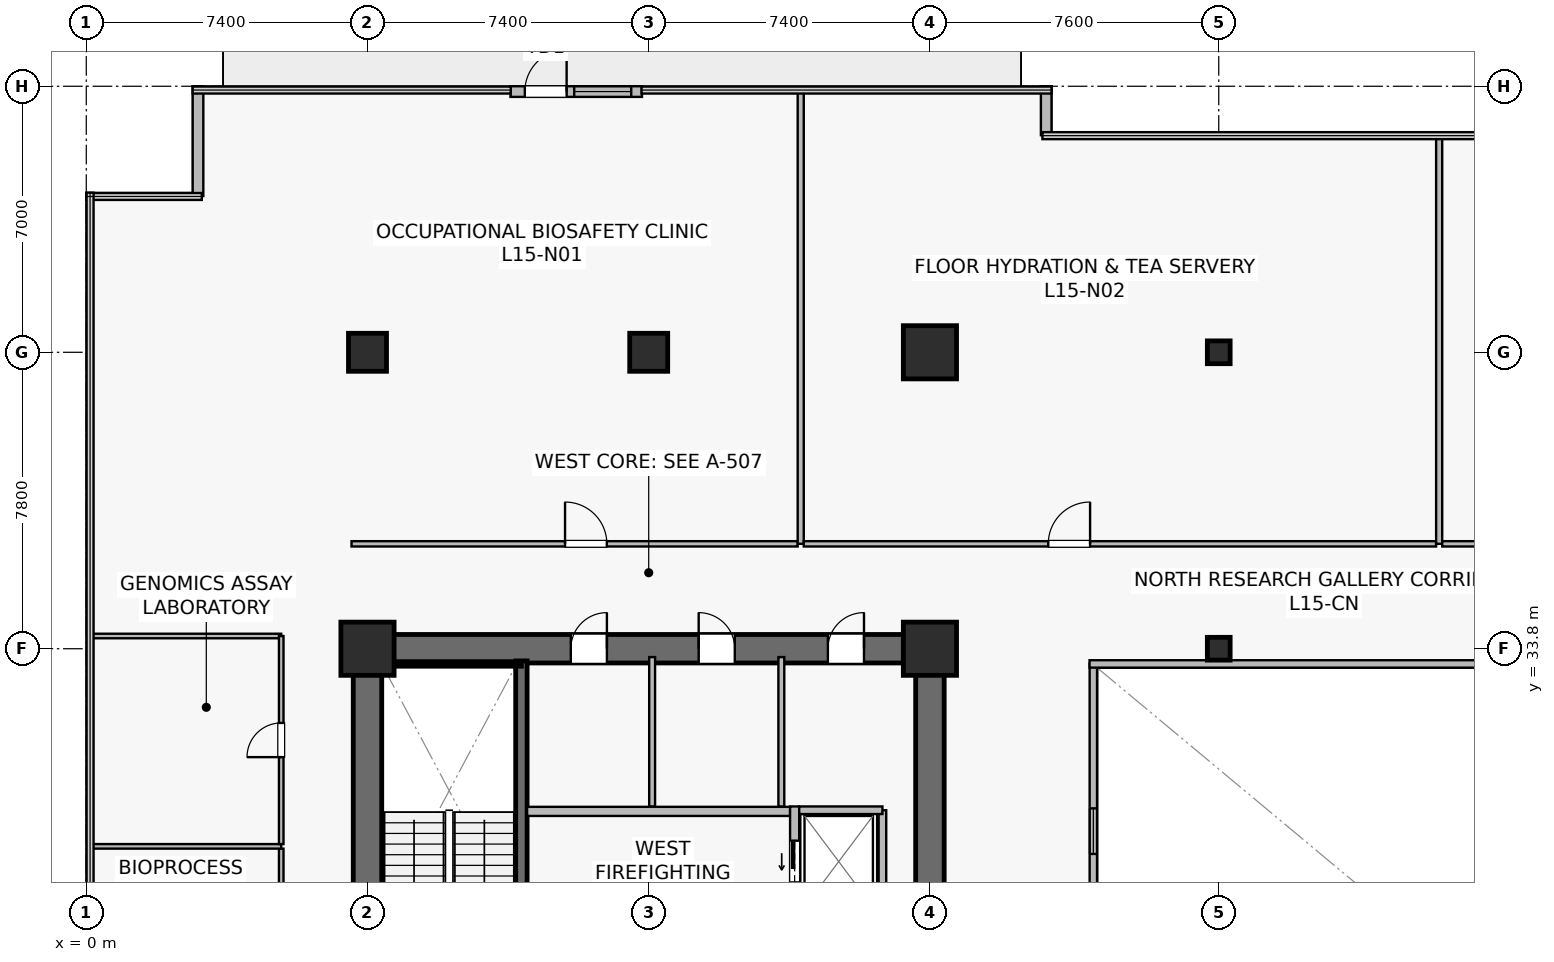
"""IFC4 building model, lengths in metres.
Left out: names, types, materials, properties, quantities, classifications, styles, units other than length and angle.
Written with IfcOpenShell. Run it as: python <this file> out.ifc"""

import sys

from ifc_helpers import new_model, si_unit, direction, frame, frame_2d, origin, origin_2d, place, context, subcontext, project, spatial, rectangle, hollow_rectangle, extrude, source, transform, mapped, element, fill, save


model = new_model("IFC4")
c1 = context("Model", 3, precision=1e-05, world=origin(), true_north=direction((0.0, 1.0)))
c2 = subcontext(c1, "Body", "Model", "MODEL_VIEW")
j1 = project(units=[si_unit("LENGTHUNIT", "METRE"), si_unit("PLANEANGLEUNIT", "RADIAN")], contexts=[c1])
p1 = place(None, origin())
s1 = spatial("IfcSite", under=j1, at=p1, CompositionType="ELEMENT")
p2 = place(p1, origin())
s2 = spatial("IfcBuilding", under=s1, at=p2, CompositionType="ELEMENT")
p3 = place(p2, frame((0.0, 0.0, 62.1)))
s3 = spatial("IfcBuildingStorey", under=s2, at=p3, CompositionType="ELEMENT", Elevation=62.1)
p4 = place(p3, frame((7.025, 33.8, 0.0), z_axis=(0.0, 0.0, 1.0), x_axis=(1.0, 0.0, 0.0)))
e1 = element("IfcWall", 1, at=p4, inside=s3, PredefinedType="SHEAR", context=c2, shape_type="SweptSolid", body=[
    extrude(rectangle(XDim=15.55, YDim=0.75, at=frame_2d((7.775, 0.0))), origin(), (0.0, 0.0, 1.0), 3.78),
])
p5 = place(p4, frame((5.725, 0.0, 0.0)))
e2 = element("IfcOpeningElement", 2, at=p5, cuts=e1, PredefinedType="OPENING", context=c2, shape_type="SweptSolid", body=[
    extrude(rectangle(XDim=0.95, YDim=2.15, at=frame_2d((0.475, 1.075))), frame((0.0, 0.385, 0.0), z_axis=(0.0, -1.0, 0.0), x_axis=(1.0, 0.0, 0.0)), (0.0, 0.0, 1.0), 0.77),
])
p6 = place(p4, frame((9.09, 0.0, 0.0)))
e3 = element("IfcOpeningElement", 3, at=p6, cuts=e1, PredefinedType="OPENING", context=c2, shape_type="SweptSolid", body=[
    extrude(rectangle(XDim=0.95, YDim=2.15, at=frame_2d((0.475, 1.075))), frame((0.0, 0.385, 0.0), z_axis=(0.0, -1.0, 0.0), x_axis=(1.0, 0.0, 0.0)), (0.0, 0.0, 1.0), 0.77),
])
p7 = place(p4, frame((12.49, 0.0, 0.0)))
e4 = element("IfcOpeningElement", 4, at=p7, cuts=e1, PredefinedType="OPENING", context=c2, shape_type="SweptSolid", body=[
    extrude(rectangle(XDim=0.95, YDim=2.15, at=frame_2d((0.475, 1.075))), frame((0.0, 0.385, 0.0), z_axis=(0.0, -1.0, 0.0), x_axis=(1.0, 0.0, 0.0)), (0.0, 0.0, 1.0), 0.77),
])
p8 = place(p3, frame((7.4, 15.175, 0.0), z_axis=(0.0, 0.0, 1.0), x_axis=(0.0, 1.0, 0.0)))
e5 = element("IfcWall", 5, at=p8, inside=s3, PredefinedType="SHEAR", context=c2, shape_type="SweptSolid", body=[
    extrude(rectangle(XDim=18.25, YDim=0.75, at=frame_2d((9.125, 0.0))), origin(), (0.0, 0.0, 1.0), 3.78),
])
p9 = place(p3, frame((22.2, 15.175, 0.0), z_axis=(0.0, 0.0, 1.0), x_axis=(0.0, 1.0, 0.0)))
e6 = element("IfcWall", 6, at=p9, inside=s3, PredefinedType="SHEAR", context=c2, shape_type="SweptSolid", body=[
    extrude(rectangle(XDim=18.25, YDim=0.75, at=frame_2d((9.125, 0.0))), origin(), (0.0, 0.0, 1.0), 3.78),
])
p10 = place(p9, frame((3.375, 0.0, 0.0)))
e7 = element("IfcOpeningElement", 7, at=p10, cuts=e6, PredefinedType="OPENING", context=c2, shape_type="SweptSolid", body=[
    extrude(rectangle(XDim=1.42, YDim=2.2, at=frame_2d((0.71, 1.1))), frame((0.0, 0.385, 0.0), z_axis=(0.0, -1.0, 0.0), x_axis=(1.0, 0.0, 0.0)), (0.0, 0.0, 1.0), 0.77),
])
p11 = place(p3, frame((11.45, 24.85, 0.0), z_axis=(0.0, 0.0, 1.0), x_axis=(0.0, 1.0, 0.0)))
e8 = element("IfcWall", 8, at=p11, inside=s3, PredefinedType="SHEAR", context=c2, shape_type="SweptSolid", body=[
    extrude(rectangle(XDim=8.63, YDim=0.3, at=frame_2d((4.315, 0.0))), origin(), (0.0, 0.0, 1.0), 3.78),
])
p12 = place(p11, frame((0.42, 0.0, 0.0)))
e9 = element("IfcOpeningElement", 9, at=p12, cuts=e8, PredefinedType="OPENING", context=c2, shape_type="SweptSolid", body=[
    extrude(rectangle(XDim=1.1, YDim=2.15, at=frame_2d((0.55, 1.075))), frame((0.0, 0.16, 0.0), z_axis=(0.0, -1.0, 0.0), x_axis=(1.0, 0.0, 0.0)), (0.0, 0.0, 1.0), 0.32),
])
p13 = place(p3, frame((7.73, 33.4, 0.0), z_axis=(0.0, 0.0, 1.0), x_axis=(1.0, 0.0, 0.0)))
e10 = element("IfcWall", 10, at=p13, inside=s3, PredefinedType="SOLIDWALL", context=c2, shape_type="SweptSolid", body=[
    extrude(rectangle(XDim=3.72, YDim=0.12, at=frame_2d((1.86, 0.0))), origin(), (0.0, 0.0, 1.0), 3.78),
])
m1 = source(origin(), c2, "Body", "SweptSolid", [
    extrude(rectangle(XDim=1.4, YDim=1.4, at=origin_2d()), origin(), (0.0, 0.0, 1.0), 4.1),
])
for number, where, z_axis, x_axis in (
    (11, (7.4, 33.8, 0.0), (0.0, 0.0, 1.0), (1.0, 0.0, 0.0)),
    (12, (22.2, 33.8, 0.0), (0.0, 0.0, 1.0), (1.0, 0.0, 0.0)),
):
    element("IfcColumn", number, at=place(p3, frame(where, z_axis=z_axis, x_axis=x_axis)), inside=s3, PredefinedType="COLUMN", context=c2, shape_type="MappedRepresentation", body=[
        mapped(m1, transform((0.0, 0.0, 0.0), scale=1.0)),
    ])
m2 = source(origin(), c2, "Body", "SweptSolid", [
    extrude(rectangle(XDim=1.0, YDim=1.0, at=origin_2d()), origin(), (0.0, 0.0, 1.0), 4.1),
])
p14 = place(p3, frame((14.8, 41.6, 0.0), z_axis=(0.0, 0.0, 1.0), x_axis=(1.0, 0.0, 0.0)))
e13 = element("IfcColumn", 13, at=p14, inside=s3, PredefinedType="COLUMN", context=c2, shape_type="MappedRepresentation", body=[
    mapped(m2, transform((0.0, 0.0, 0.0), scale=1.0)),
])
p15 = place(p3, frame((22.2, 41.6, 0.0), z_axis=(0.0, 0.0, 1.0), x_axis=(1.0, 0.0, 0.0)))
e14 = element("IfcColumn", 14, at=p15, inside=s3, PredefinedType="COLUMN", context=c2, shape_type="MappedRepresentation", body=[
    mapped(m1, transform((0.0, 0.0, 0.0), scale=1.0)),
])
p16 = place(p3, frame((7.4, 41.6, 0.0), z_axis=(0.0, 0.0, 1.0), x_axis=(1.0, 0.0, 0.0)))
e15 = element("IfcColumn", 15, at=p16, inside=s3, PredefinedType="COLUMN", context=c2, shape_type="MappedRepresentation", body=[
    mapped(m2, transform((0.0, 0.0, 0.0), scale=1.0)),
])
m3 = source(origin(), c2, "Body", "SweptSolid", [
    extrude(hollow_rectangle(XDim=0.6, YDim=0.6, WallThickness=0.028, at=origin_2d()), origin(), (0.0, 0.0, 1.0), 4.1),
])
for number, where, z_axis, x_axis in (
    (16, (29.8, 33.8, 0.0), (0.0, 0.0, 1.0), (1.0, 0.0, 0.0)),
    (17, (29.8, 41.6, 0.0), (0.0, 0.0, 1.0), (1.0, 0.0, 0.0)),
):
    element("IfcColumn", number, at=place(p3, frame(where, z_axis=z_axis, x_axis=x_axis)), inside=s3, PredefinedType="COLUMN", context=c2, shape_type="MappedRepresentation", body=[
        mapped(m3, transform((0.0, 0.0, 0.0), scale=1.0)),
    ])
p17 = place(p3, frame((11.162, 48.46, 0.0), z_axis=(0.0, 0.0, 1.0), x_axis=(1.0, 0.0, 0.0)))
e18 = element("IfcWall", 18, at=p17, inside=s3, PredefinedType="STANDARD", context=c2, shape_type="SweptSolid", body=[
    extrude(rectangle(XDim=3.461, YDim=0.28, at=frame_2d((1.73, 0.0))), origin(), (0.0, 0.0, 1.0), 3.78),
])
p18 = place(p17, frame((0.378, 0.0, 0.0)))
e19 = element("IfcOpeningElement", 19, at=p18, cuts=e18, PredefinedType="OPENING", context=c2, shape_type="SweptSolid", body=[
    extrude(rectangle(XDim=1.1, YDim=2.2, at=frame_2d((0.55, 1.1))), frame((0.0, 0.15, 0.0), z_axis=(0.0, -1.0, 0.0), x_axis=(1.0, 0.0, 0.0)), (0.0, 0.0, 1.0), 0.3),
])
p19 = place(p17, frame((1.678, 0.0, 0.9)))
e20 = element("IfcOpeningElement", 20, at=p19, cuts=e18, PredefinedType="OPENING", context=c2, shape_type="SweptSolid", body=[
    extrude(rectangle(XDim=1.5, YDim=2.2, at=frame_2d((0.75, 1.1))), frame((0.0, 0.15, 0.0), z_axis=(0.0, -1.0, 0.0), x_axis=(1.0, 0.0, 0.0)), (0.0, 0.0, 1.0), 0.3),
])
p20 = place(p3, frame((25.26, 47.312, 0.0), z_axis=(0.0, 0.0, 1.0), x_axis=(0.0, 1.0, 0.0)))
e21 = element("IfcWall", 21, at=p20, inside=s3, PredefinedType="STANDARD", context=c2, shape_type="SweptSolid", body=[
    extrude(rectangle(XDim=1.288, YDim=0.28, at=frame_2d((0.644, 0.0))), origin(), (0.0, 0.0, 1.0), 3.78),
])
p21 = place(p3, frame((2.94, 48.6, 0.0), z_axis=(0.0, 0.0, 1.0), x_axis=(0.0, -1.0, 0.0)))
e22 = element("IfcWall", 22, at=p21, inside=s3, PredefinedType="STANDARD", context=c2, shape_type="SweptSolid", body=[
    extrude(rectangle(XDim=2.888, YDim=0.28, at=frame_2d((1.444, 0.0))), origin(), (0.0, 0.0, 1.0), 3.78),
])
p22 = place(p3, frame((11.6, 29.52, 0.0), z_axis=(0.0, 0.0, 1.0), x_axis=(1.0, 0.0, 0.0)))
e23 = element("IfcWall", 23, at=p22, inside=s3, PredefinedType="SOLIDWALL", context=c2, shape_type="SweptSolid", body=[
    extrude(rectangle(XDim=6.92, YDim=0.24, at=frame_2d((3.46, 0.0))), origin(), (0.0, 0.0, 1.0), 3.115),
])
p23 = place(p3, frame((18.64, 22.8, 0.0), z_axis=(0.0, 0.0, 1.0), x_axis=(0.0, 1.0, 0.0)))
e24 = element("IfcWall", 24, at=p23, inside=s3, PredefinedType="SOLIDWALL", context=c2, shape_type="SweptSolid", body=[
    extrude(rectangle(XDim=6.85, YDim=0.24, at=frame_2d((3.425, 0.0))), origin(), (0.0, 0.0, 1.0), 2.865),
])
p24 = place(p23, frame((4.85, 0.0, 0.0)))
e25 = element("IfcOpeningElement", 25, at=p24, cuts=e24, PredefinedType="OPENING", context=c2, shape_type="SweptSolid", body=[
    extrude(rectangle(XDim=1.1, YDim=2.22, at=frame_2d((0.55, 1.11))), frame((0.0, 0.13, 0.0), z_axis=(0.0, -1.0, 0.0), x_axis=(1.0, 0.0, 0.0)), (0.0, 0.0, 1.0), 0.26),
])
p25 = place(p23, frame((1.0, 0.0, 0.0)))
e26 = element("IfcOpeningElement", 26, at=p25, cuts=e24, PredefinedType="OPENING", context=c2, shape_type="SweptSolid", body=[
    extrude(rectangle(XDim=1.2, YDim=2.22, at=frame_2d((0.6, 1.11))), frame((0.0, 0.13, 0.0), z_axis=(0.0, -1.0, 0.0), x_axis=(1.0, 0.0, 0.0)), (0.0, 0.0, 1.0), 0.26),
])
p26 = place(p3, frame((20.95, 26.85, 0.0), z_axis=(0.0, 0.0, 1.0), x_axis=(0.0, 1.0, 0.0)))
e27 = element("IfcWall", 27, at=p26, inside=s3, PredefinedType="SOLIDWALL", context=c2, shape_type="SweptSolid", body=[
    extrude(rectangle(XDim=2.7, YDim=0.2, at=frame_2d((1.35, 0.0))), origin(), (0.0, 0.0, 1.0), 3.78),
])
p27 = place(p3, frame((18.76, 29.55, 0.0), z_axis=(0.0, 0.0, 1.0), x_axis=(1.0, 0.0, 0.0)))
e28 = element("IfcWall", 28, at=p27, inside=s3, PredefinedType="SOLIDWALL", context=c2, shape_type="SweptSolid", body=[
    extrude(rectangle(XDim=2.19, YDim=0.2, at=frame_2d((1.095, 0.0))), origin(), (0.0, 0.0, 1.0), 3.78),
])
p28 = place(p3, frame((14.89, 29.65, 0.0), z_axis=(0.0, 0.0, 1.0), x_axis=(0.0, 1.0, 0.0)))
e29 = element("IfcWall", 29, at=p28, inside=s3, PredefinedType="PLUMBINGWALL", context=c2, shape_type="SweptSolid", body=[
    extrude(rectangle(XDim=3.93, YDim=0.155, at=frame_2d((1.965, 0.0))), origin(), (0.0, 0.0, 1.0), 3.115),
])
p29 = place(p3, frame((18.29, 29.65, 0.0), z_axis=(0.0, 0.0, 1.0), x_axis=(0.0, 1.0, 0.0)))
e30 = element("IfcWall", 30, at=p29, inside=s3, PredefinedType="PLUMBINGWALL", context=c2, shape_type="SweptSolid", body=[
    extrude(rectangle(XDim=3.93, YDim=0.155, at=frame_2d((1.965, 0.0))), origin(), (0.0, 0.0, 1.0), 3.78),
])
p30 = place(p3, frame((26.5, 15.2, 0.0), z_axis=(0.0, 0.0, 1.0), x_axis=(0.0, 1.0, 0.0)))
e31 = element("IfcWall", 31, at=p30, inside=s3, PredefinedType="SOLIDWALL", context=c2, shape_type="SweptSolid", body=[
    extrude(rectangle(XDim=18.2, YDim=0.195, at=frame_2d((9.1, 0.0))), origin(), (0.0, 0.0, 1.0), 3.78),
])
p31 = place(p30, frame((1.8, 0.0, 0.9)))
e32 = element("IfcOpeningElement", 32, at=p31, cuts=e31, PredefinedType="OPENING", context=c2, shape_type="SweptSolid", body=[
    extrude(rectangle(XDim=1.2, YDim=1.35, at=frame_2d((0.6, 0.675))), frame((0.0, 0.107, 0.0), z_axis=(0.0, -1.0, 0.0), x_axis=(1.0, 0.0, 0.0)), (0.0, 0.0, 1.0), 0.215),
])
p32 = place(p30, frame((13.2, 0.0, 0.9)))
e33 = element("IfcOpeningElement", 33, at=p32, cuts=e31, PredefinedType="OPENING", context=c2, shape_type="SweptSolid", body=[
    extrude(rectangle(XDim=1.2, YDim=1.35, at=frame_2d((0.6, 0.675))), frame((0.0, 0.107, 0.0), z_axis=(0.0, -1.0, 0.0), x_axis=(1.0, 0.0, 0.0)), (0.0, 0.0, 1.0), 0.215),
])
p33 = place(p3, frame((26.4, 33.4, 0.0), z_axis=(0.0, 0.0, 1.0), x_axis=(1.0, 0.0, 0.0)))
e34 = element("IfcWall", 34, at=p33, inside=s3, PredefinedType="SOLIDWALL", context=c2, shape_type="SweptSolid", body=[
    extrude(rectangle(XDim=22.0, YDim=0.195, at=frame_2d((11.0, 0.0))), origin(), (0.0, 0.0, 1.0), 3.78),
])
p34 = place(p3, frame((6.98, 36.56, 0.0), z_axis=(0.0, 0.0, 1.0), x_axis=(1.0, 0.0, 0.0)))
e35 = element("IfcWall", 35, at=p34, inside=s3, PredefinedType="PARTITIONING", context=c2, shape_type="SweptSolid", body=[
    extrude(rectangle(XDim=11.74, YDim=0.14, at=frame_2d((5.87, 0.0))), origin(), (0.0, 0.0, 1.0), 3.115),
])
p35 = place(p34, frame((5.618, 0.0, 0.0)))
e36 = element("IfcOpeningElement", 36, at=p35, cuts=e35, PredefinedType="OPENING", context=c2, shape_type="SweptSolid", body=[
    extrude(rectangle(XDim=1.1, YDim=2.18, at=frame_2d((0.55, 1.09))), frame((0.0, 0.08, 0.0), z_axis=(0.0, -1.0, 0.0), x_axis=(1.0, 0.0, 0.0)), (0.0, 0.0, 1.0), 0.16),
])
p36 = place(p3, frame((18.8, 36.56, 0.0), z_axis=(0.0, 0.0, 1.0), x_axis=(0.0, 1.0, 0.0)))
e37 = element("IfcWall", 37, at=p36, inside=s3, PredefinedType="PARTITIONING", context=c2, shape_type="SweptSolid", body=[
    extrude(rectangle(XDim=11.93, YDim=0.16, at=frame_2d((5.965, 0.0))), origin(), (0.0, 0.0, 1.0), 3.015),
])
p37 = place(p3, frame((18.88, 36.56, 0.0), z_axis=(0.0, 0.0, 1.0), x_axis=(1.0, 0.0, 0.0)))
e38 = element("IfcWall", 38, at=p37, inside=s3, PredefinedType="PARTITIONING", context=c2, shape_type="SweptSolid", body=[
    extrude(rectangle(XDim=16.64, YDim=0.14, at=frame_2d((8.32, 0.0))), origin(), (0.0, 0.0, 1.0), 3.115),
])
p38 = place(p37, frame((6.434, 0.0, 0.0)))
e39 = element("IfcOpeningElement", 39, at=p38, cuts=e38, PredefinedType="OPENING", context=c2, shape_type="SweptSolid", body=[
    extrude(rectangle(XDim=1.1, YDim=2.18, at=frame_2d((0.55, 1.09))), frame((0.0, 0.08, 0.0), z_axis=(0.0, -1.0, 0.0), x_axis=(1.0, 0.0, 0.0)), (0.0, 0.0, 1.0), 0.16),
])
p39 = place(p3, frame((35.6, 36.56, 0.0), z_axis=(0.0, 0.0, 1.0), x_axis=(0.0, 1.0, 0.0)))
e40 = element("IfcWall", 40, at=p39, inside=s3, PredefinedType="PARTITIONING", context=c2, shape_type="SweptSolid", body=[
    extrude(rectangle(XDim=10.73, YDim=0.16, at=frame_2d((5.365, 0.0))), origin(), (0.0, 0.0, 1.0), 3.015),
])
p40 = place(p3, frame((35.68, 36.56, 0.0), z_axis=(0.0, 0.0, 1.0), x_axis=(1.0, 0.0, 0.0)))
e41 = element("IfcWall", 41, at=p40, inside=s3, PredefinedType="PARTITIONING", context=c2, shape_type="SweptSolid", body=[
    extrude(rectangle(XDim=17.64, YDim=0.14, at=frame_2d((8.82, 0.0))), origin(), (0.0, 0.0, 1.0), 3.115),
])
p41 = place(p40, frame((8.745, 0.0, 0.0)))
e42 = element("IfcOpeningElement", 42, at=p41, cuts=e41, PredefinedType="OPENING", context=c2, shape_type="SweptSolid", body=[
    extrude(rectangle(XDim=1.1, YDim=2.18, at=frame_2d((0.55, 1.09))), frame((0.0, 0.08, 0.0), z_axis=(0.0, -1.0, 0.0), x_axis=(1.0, 0.0, 0.0)), (0.0, 0.0, 1.0), 0.16),
])
p42 = place(p3, frame((0.11, 34.135, 0.0), z_axis=(0.0, 0.0, 1.0), x_axis=(1.0, 0.0, 0.0)))
e43 = element("IfcWall", 43, at=p42, inside=s3, PredefinedType="PARTITIONING", context=c2, shape_type="SweptSolid", body=[
    extrude(rectangle(XDim=5.02, YDim=0.12, at=frame_2d((2.51, 0.0))), origin(), (0.0, 0.0, 1.0), 3.78),
])
p43 = place(p3, frame((5.13, 21.06, 0.0), z_axis=(0.0, 0.0, 1.0), x_axis=(0.0, 1.0, 0.0)))
e44 = element("IfcWall", 44, at=p43, inside=s3, PredefinedType="PARTITIONING", context=c2, shape_type="SweptSolid", body=[
    extrude(rectangle(XDim=7.48, YDim=0.12, at=frame_2d((3.74, 0.0))), origin(), (0.0, 0.0, 1.0), 3.78),
])
p44 = place(p43, frame((3.29, 0.0, 0.0)))
e45 = element("IfcOpeningElement", 45, at=p44, cuts=e44, PredefinedType="OPENING", context=c2, shape_type="SweptSolid", body=[
    extrude(rectangle(XDim=0.9, YDim=2.1, at=frame_2d((0.45, 1.05))), frame((0.0, 0.07, 0.0), z_axis=(0.0, -1.0, 0.0), x_axis=(1.0, 0.0, 0.0)), (0.0, 0.0, 1.0), 0.14),
])
p45 = place(p3, frame((0.11, 28.6, 0.0), z_axis=(0.0, 0.0, 1.0), x_axis=(1.0, 0.0, 0.0)))
e46 = element("IfcWall", 46, at=p45, inside=s3, PredefinedType="PARTITIONING", context=c2, shape_type="SweptSolid", body=[
    extrude(rectangle(XDim=5.02, YDim=0.12, at=frame_2d((2.51, 0.0))), origin(), (0.0, 0.0, 1.0), 3.78),
])
p46 = place(p3, frame((5.13, 28.66, 0.0), z_axis=(0.0, 0.0, 1.0), x_axis=(0.0, 1.0, 0.0)))
e47 = element("IfcWall", 47, at=p46, inside=s3, PredefinedType="PARTITIONING", context=c2, shape_type="SweptSolid", body=[
    extrude(rectangle(XDim=5.475, YDim=0.12, at=frame_2d((2.738, 0.0))), origin(), (0.0, 0.0, 1.0), 3.78),
])
p47 = place(p46, frame((2.288, 0.0, 0.0)))
e48 = element("IfcOpeningElement", 48, at=p47, cuts=e47, PredefinedType="OPENING", context=c2, shape_type="SweptSolid", body=[
    extrude(rectangle(XDim=0.9, YDim=2.1, at=frame_2d((0.45, 1.05))), frame((0.0, 0.07, 0.0), z_axis=(0.0, -1.0, 0.0), x_axis=(1.0, 0.0, 0.0)), (0.0, 0.0, 1.0), 0.14),
])
m4 = source(origin(), c2, "Body", "SweptSolid", [
    extrude(rectangle(XDim=1.1, YDim=2.2, at=frame_2d((0.55, 1.1))), frame((0.0, 0.025, 0.0), z_axis=(0.0, -1.0, 0.0), x_axis=(1.0, 0.0, 0.0)), (0.0, 0.0, 1.0), 0.05),
])
p48 = place(p18, origin())
e49 = element("IfcDoor", 49, at=p48, inside=s3, OperationType="SINGLE_SWING_RIGHT", PredefinedType="DOOR", context=c2, shape_type="MappedRepresentation", body=[
    mapped(m4, transform((0.0, 0.0, 0.0), scale=1.0)),
])
fill(e19, e49)
m5 = source(origin(), c2, "Body", "SweptSolid", [
    extrude(rectangle(XDim=1.5, YDim=2.2, at=frame_2d((0.75, 1.1))), frame((0.0, 0.03, 0.0), z_axis=(0.0, -1.0, 0.0), x_axis=(1.0, 0.0, 0.0)), (0.0, 0.0, 1.0), 0.06),
])
p49 = place(p19, origin())
e50 = element("IfcWindow", 50, at=p49, inside=s3, PartitioningType="SINGLE_PANEL", PredefinedType="WINDOW", context=c2, shape_type="MappedRepresentation", body=[
    mapped(m5, transform((0.0, 0.0, 0.0), scale=1.0)),
])
fill(e20, e50)
m6 = source(origin(), c2, "Body", "SweptSolid", [
    extrude(rectangle(XDim=1.2, YDim=1.35, at=frame_2d((0.6, 0.675))), frame((0.0, 0.03, 0.0), z_axis=(0.0, -1.0, 0.0), x_axis=(1.0, 0.0, 0.0)), (0.0, 0.0, 1.0), 0.06),
])
p50 = place(p32, origin())
e51 = element("IfcWindow", 51, at=p50, inside=s3, PartitioningType="SINGLE_PANEL", PredefinedType="WINDOW", context=c2, shape_type="MappedRepresentation", body=[
    mapped(m6, transform((0.0, 0.0, 0.0), scale=1.0)),
])
fill(e33, e51)
m7 = source(origin(), c2, "Body", "SweptSolid", [
    extrude(rectangle(XDim=1.1, YDim=2.22, at=frame_2d((0.55, 1.11))), frame((0.0, 0.025, 0.0), z_axis=(0.0, -1.0, 0.0), x_axis=(1.0, 0.0, 0.0)), (0.0, 0.0, 1.0), 0.05),
])
p51 = place(p24, origin())
e52 = element("IfcDoor", 52, at=p51, inside=s3, OperationType="SLIDING_TO_LEFT", PredefinedType="USERDEFINED", context=c2, shape_type="MappedRepresentation", body=[
    mapped(m7, transform((0.0, 0.0, 0.0), scale=1.0)),
])
fill(e25, e52)
m8 = source(origin(), c2, "Body", "SweptSolid", [
    extrude(rectangle(XDim=0.95, YDim=2.15, at=frame_2d((0.475, 1.075))), frame((0.0, 0.025, 0.0), z_axis=(0.0, -1.0, 0.0), x_axis=(1.0, 0.0, 0.0)), (0.0, 0.0, 1.0), 0.05),
])
p52 = place(p5, origin())
e53 = element("IfcDoor", 53, at=p52, inside=s3, OperationType="SINGLE_SWING_RIGHT", PredefinedType="DOOR", context=c2, shape_type="MappedRepresentation", body=[
    mapped(m8, transform((0.0, 0.0, 0.0), scale=1.0)),
])
fill(e2, e53)
p53 = place(p6, origin())
e54 = element("IfcDoor", 54, at=p53, inside=s3, OperationType="SINGLE_SWING_LEFT", PredefinedType="DOOR", context=c2, shape_type="MappedRepresentation", body=[
    mapped(m8, transform((0.0, 0.0, 0.0), scale=1.0)),
])
fill(e3, e54)
p54 = place(p7, origin())
e55 = element("IfcDoor", 55, at=p54, inside=s3, OperationType="SINGLE_SWING_RIGHT", PredefinedType="DOOR", context=c2, shape_type="MappedRepresentation", body=[
    mapped(m8, transform((0.0, 0.0, 0.0), scale=1.0)),
])
fill(e4, e55)
m9 = source(origin(), c2, "Body", "SweptSolid", [
    extrude(rectangle(XDim=1.1, YDim=2.18, at=frame_2d((0.55, 1.09))), frame((0.0, 0.025, 0.0), z_axis=(0.0, -1.0, 0.0), x_axis=(1.0, 0.0, 0.0)), (0.0, 0.0, 1.0), 0.05),
])
p55 = place(p35, origin())
e56 = element("IfcDoor", 56, at=p55, inside=s3, OperationType="SINGLE_SWING_LEFT", PredefinedType="DOOR", context=c2, shape_type="MappedRepresentation", body=[
    mapped(m9, transform((0.0, 0.0, 0.0), scale=1.0)),
])
fill(e36, e56)
p56 = place(p38, origin())
e57 = element("IfcDoor", 57, at=p56, inside=s3, OperationType="SINGLE_SWING_RIGHT", PredefinedType="DOOR", context=c2, shape_type="MappedRepresentation", body=[
    mapped(m9, transform((0.0, 0.0, 0.0), scale=1.0)),
])
fill(e39, e57)
m10 = source(origin(), c2, "Body", "SweptSolid", [
    extrude(rectangle(XDim=0.9, YDim=2.1, at=frame_2d((0.45, 1.05))), frame((0.0, 0.025, 0.0), z_axis=(0.0, -1.0, 0.0), x_axis=(1.0, 0.0, 0.0)), (0.0, 0.0, 1.0), 0.05),
])
p57 = place(p47, origin())
e58 = element("IfcDoor", 58, at=p57, inside=s3, OperationType="SINGLE_SWING_LEFT", PredefinedType="DOOR", context=c2, shape_type="MappedRepresentation", body=[
    mapped(m10, transform((0.0, 0.0, 0.0), scale=1.0)),
])
fill(e48, e58)
save(model, sys.argv[1])
